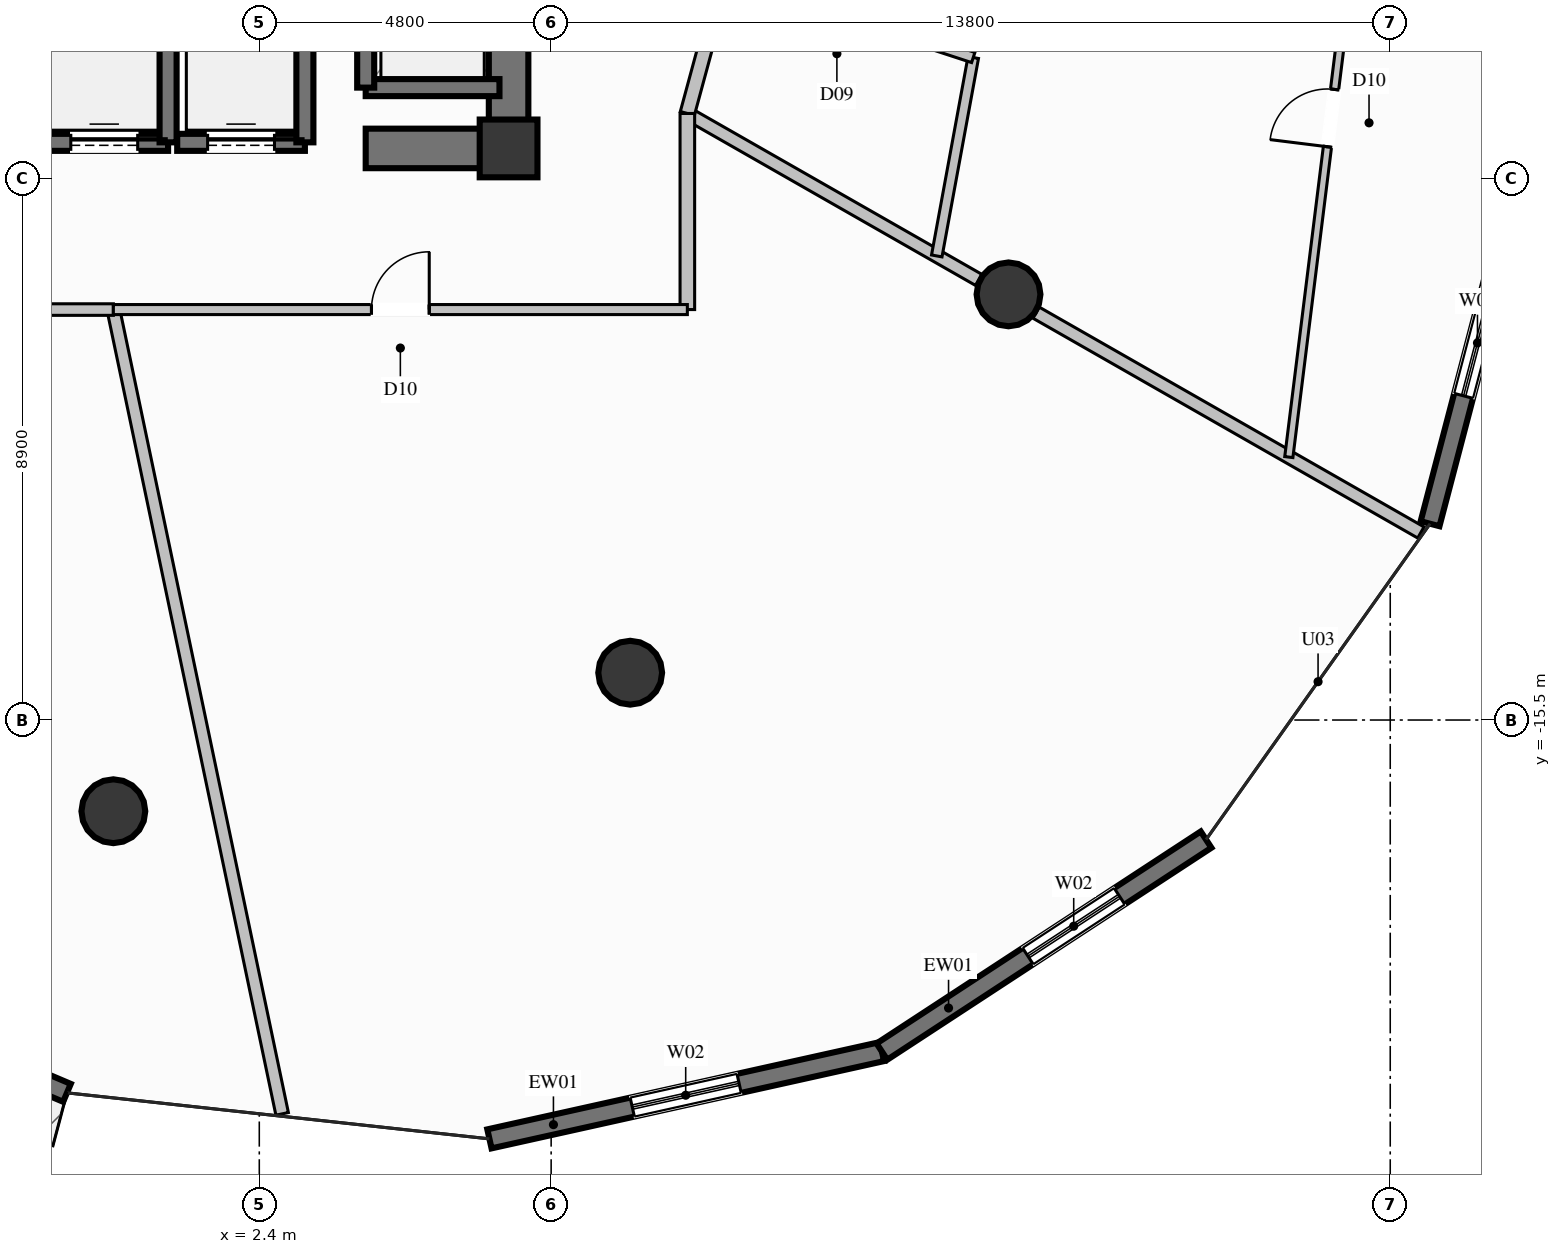
"""IFC4 building model, lengths in metres.
Left out: names, types, materials, properties, quantities, classifications, styles, units other than length and angle.
Written with IfcOpenShell. Run it as: python <this file> out.ifc"""

import sys

from ifc_helpers import new_model, si_unit, direction, frame, frame_2d, origin, origin_2d, place, context, subcontext, project, spatial, rectangle, circle, extrude, element, fill, save


model = new_model("IFC4")
c1 = context("Model", 3, precision=1e-05, world=origin(), true_north=direction((0.0, 1.0)))
c2 = subcontext(c1, "Body", "Model", "MODEL_VIEW")
j1 = project(units=[si_unit("LENGTHUNIT", "METRE"), si_unit("PLANEANGLEUNIT", "RADIAN")], contexts=[c1])
p1 = place(None, origin())
s1 = spatial("IfcSite", under=j1, at=p1, CompositionType="ELEMENT")
p2 = place(p1, origin())
s2 = spatial("IfcBuilding", under=s1, at=p2, CompositionType="ELEMENT")
p3 = place(p2, frame((0.0, 0.0, 149.4)))
s3 = spatial("IfcBuildingStorey", under=s2, at=p3, CompositionType="ELEMENT", Elevation=149.4)
p4 = place(p3, frame((6.5, -6.1, 0.0), z_axis=(0.0, 0.0, 1.0), x_axis=(1.0, 0.0, 0.0)))
e1 = element("IfcColumn", 1, at=p4, inside=s3, PredefinedType="COLUMN", context=c2, shape_type="SweptSolid", body=[
    extrude(rectangle(XDim=0.95, YDim=0.95, at=origin_2d()), origin(), (0.0, 0.0, 1.0), 3.6),
])
p5 = place(p3, frame((4.15, -6.1, 0.0), z_axis=(0.0, 0.0, 1.0), x_axis=(1.0, 0.0, 0.0)))
e2 = element("IfcWall", 2, at=p5, inside=s3, PredefinedType="SHEAR", context=c2, shape_type="SweptSolid", body=[
    extrude(rectangle(XDim=2.025, YDim=0.65, at=frame_2d((1.013, 0.0))), origin(), (0.0, 0.0, 1.0), 3.6),
])
p6 = place(p3, frame((6.5, -6.425, 0.0), z_axis=(0.0, 0.0, 1.0), x_axis=(0.0, 1.0, 0.0)))
e3 = element("IfcWall", 3, at=p6, inside=s3, PredefinedType="SHEAR", context=c2, shape_type="SweptSolid", body=[
    extrude(rectangle(XDim=4.075, YDim=0.65, at=frame_2d((2.038, 0.0))), origin(), (0.0, 0.0, 1.0), 3.6),
])
for number, where, z_axis, x_axis in (
    (4, (0.0, -17.0, 0.0), (0.0, 0.0, 1.0), (1.0, 0.0, 0.0)),
    (5, (8.5, -14.722, 0.0), (0.0, 0.0, 1.0), (1.0, 0.0, 0.0)),
    (6, (14.722, -8.5, 0.0), (0.0, 0.0, 1.0), (1.0, 0.0, 0.0)),
):
    element("IfcColumn", number, at=place(p3, frame(where, z_axis=z_axis, x_axis=x_axis)), inside=s3, PredefinedType="COLUMN", context=c2, shape_type="SweptSolid", body=[
        extrude(circle(Radius=0.525, at=origin_2d()), origin(), (0.0, 0.0, 1.0), 3.6),
    ])
p7 = place(p3, frame((23.332, -5.875, 0.0), z_axis=(0.0, 0.0, 1.0), x_axis=(-0.253586412891, -0.967312737018, 0.0)))
e7 = element("IfcWall", 7, at=p7, inside=s3, PredefinedType="SOLIDWALL", context=c2, shape_type="SweptSolid", body=[
    extrude(rectangle(XDim=6.613, YDim=0.32, at=frame_2d((3.307, 0.0))), origin(), (0.0, 0.0, 1.0), 3.35),
])
p8 = place(p7, frame((2.639, 0.0, 0.35)))
e8 = element("IfcOpeningElement", 8, at=p8, cuts=e7, PredefinedType="OPENING", context=c2, shape_type="SweptSolid", body=[
    extrude(rectangle(XDim=1.8, YDim=2.6, at=frame_2d((0.9, 1.3))), frame((0.0, 0.17, 0.0), z_axis=(0.0, -1.0, 0.0), x_axis=(1.0, 0.0, 0.0)), (0.0, 0.0, 1.0), 0.34),
])
p9 = place(p3, frame((-0.763, -21.631, 0.0), z_axis=(0.0, 0.0, 1.0), x_axis=(-0.920301307609, 0.391210305607, 0.0)))
e9 = element("IfcWall", 9, at=p9, inside=s3, PredefinedType="SOLIDWALL", context=c2, shape_type="SweptSolid", body=[
    extrude(rectangle(XDim=7.346, YDim=0.32, at=frame_2d((3.673, 0.0))), origin(), (0.0, 0.0, 1.0), 3.35),
])
p10 = place(p9, frame((2.773, 0.0, 0.35)))
e10 = element("IfcOpeningElement", 10, at=p10, cuts=e9, PredefinedType="OPENING", context=c2, shape_type="SweptSolid", body=[
    extrude(rectangle(XDim=1.8, YDim=2.6, at=frame_2d((0.9, 1.3))), frame((0.0, 0.17, 0.0), z_axis=(0.0, -1.0, 0.0), x_axis=(1.0, 0.0, 0.0)), (0.0, 0.0, 1.0), 0.34),
])
p11 = place(p3, frame((12.64, -20.953, 0.0), z_axis=(0.0, 0.0, 1.0), x_axis=(-0.976166205915, -0.217024280736, 0.0)))
e11 = element("IfcWall", 11, at=p11, inside=s3, PredefinedType="SOLIDWALL", context=c2, shape_type="SweptSolid", body=[
    extrude(rectangle(XDim=6.613, YDim=0.32, at=frame_2d((3.306, 0.0))), origin(), (0.0, 0.0, 1.0), 3.35),
])
p12 = place(p11, frame((2.406, 0.0, 0.35)))
e12 = element("IfcOpeningElement", 12, at=p12, cuts=e11, PredefinedType="OPENING", context=c2, shape_type="SweptSolid", body=[
    extrude(rectangle(XDim=1.8, YDim=2.6, at=frame_2d((0.9, 1.3))), frame((0.0, 0.17, 0.0), z_axis=(0.0, -1.0, 0.0), x_axis=(1.0, 0.0, 0.0)), (0.0, 0.0, 1.0), 0.34),
])
p13 = place(p3, frame((17.971, -17.467, 0.0), z_axis=(0.0, 0.0, 1.0), x_axis=(-0.836958810109, -0.547265886185, 0.0)))
e13 = element("IfcWall", 13, at=p13, inside=s3, PredefinedType="SOLIDWALL", context=c2, shape_type="SweptSolid", body=[
    extrude(rectangle(XDim=6.37, YDim=0.32, at=frame_2d((3.185, 0.0))), origin(), (0.0, 0.0, 1.0), 3.35),
])
p14 = place(p13, frame((1.701, 0.0, 0.35)))
e14 = element("IfcOpeningElement", 14, at=p14, cuts=e13, PredefinedType="OPENING", context=c2, shape_type="SweptSolid", body=[
    extrude(rectangle(XDim=1.8, YDim=2.6, at=frame_2d((0.9, 1.3))), frame((0.0, 0.17, 0.0), z_axis=(0.0, -1.0, 0.0), x_axis=(1.0, 0.0, 0.0)), (0.0, 0.0, 1.0), 0.34),
])
p15 = place(p3, frame((-1.2, -6.0, 0.0), z_axis=(0.0, 0.0, 1.0), x_axis=(1.0, 0.0, 0.0)))
e15 = element("IfcWall", 15, at=p15, inside=s3, PredefinedType="SOLIDWALL", context=c2, shape_type="SweptSolid", body=[
    extrude(rectangle(XDim=2.1, YDim=0.28, at=frame_2d((1.05, 0.0))), origin(), (0.0, 0.0, 1.0), 3.35),
])
p16 = place(p15, frame((0.5, 0.0, 0.0)))
e16 = element("IfcOpeningElement", 16, at=p16, cuts=e15, PredefinedType="OPENING", context=c2, shape_type="SweptSolid", body=[
    extrude(rectangle(XDim=1.1, YDim=2.2, at=frame_2d((0.55, 1.1))), frame((0.0, 0.15, 0.0), z_axis=(0.0, -1.0, 0.0), x_axis=(1.0, 0.0, 0.0)), (0.0, 0.0, 1.0), 0.3),
])
p17 = place(p3, frame((0.9, -6.0, 0.0), z_axis=(0.0, 0.0, 1.0), x_axis=(0.0, 1.0, 0.0)))
e17 = element("IfcWall", 17, at=p17, inside=s3, PredefinedType="SOLIDWALL", context=c2, shape_type="SweptSolid", body=[
    extrude(rectangle(XDim=2.5, YDim=0.28, at=frame_2d((1.25, 0.0))), origin(), (0.0, 0.0, 1.0), 3.35),
])
p18 = place(p3, frame((1.05, -6.0, 0.0), z_axis=(0.0, 0.0, 1.0), x_axis=(1.0, 0.0, 0.0)))
e18 = element("IfcWall", 18, at=p18, inside=s3, PredefinedType="SOLIDWALL", context=c2, shape_type="SweptSolid", body=[
    extrude(rectangle(XDim=2.1, YDim=0.28, at=frame_2d((1.05, 0.0))), origin(), (0.0, 0.0, 1.0), 3.35),
])
p19 = place(p18, frame((0.5, 0.0, 0.0)))
e19 = element("IfcOpeningElement", 19, at=p19, cuts=e18, PredefinedType="OPENING", context=c2, shape_type="SweptSolid", body=[
    extrude(rectangle(XDim=1.1, YDim=2.2, at=frame_2d((0.55, 1.1))), frame((0.0, 0.15, 0.0), z_axis=(0.0, -1.0, 0.0), x_axis=(1.0, 0.0, 0.0)), (0.0, 0.0, 1.0), 0.3),
])
p20 = place(p3, frame((3.15, -6.0, 0.0), z_axis=(0.0, 0.0, 1.0), x_axis=(0.0, 1.0, 0.0)))
e20 = element("IfcWall", 20, at=p20, inside=s3, PredefinedType="SOLIDWALL", context=c2, shape_type="SweptSolid", body=[
    extrude(rectangle(XDim=2.5, YDim=0.28, at=frame_2d((1.25, 0.0))), origin(), (0.0, 0.0, 1.0), 3.35),
])
p21 = place(p3, frame((4.15, -5.1, 0.0), z_axis=(0.0, 0.0, 1.0), x_axis=(1.0, 0.0, 0.0)))
e21 = element("IfcWall", 21, at=p21, inside=s3, PredefinedType="SOLIDWALL", context=c2, shape_type="SweptSolid", body=[
    extrude(rectangle(XDim=2.2, YDim=0.28, at=frame_2d((1.1, 0.0))), origin(), (0.0, 0.0, 1.0), 3.35),
])
p22 = place(p3, frame((4.15, -2.4, 0.0), z_axis=(0.0, 0.0, 1.0), x_axis=(0.0, -1.0, 0.0)))
e22 = element("IfcWall", 22, at=p22, inside=s3, PredefinedType="SOLIDWALL", context=c2, shape_type="SweptSolid", body=[
    extrude(rectangle(XDim=2.7, YDim=0.28, at=frame_2d((1.35, 0.0))), origin(), (0.0, 0.0, 1.0), 3.35),
])
p23 = place(p3, frame((9.44, -5.525, 0.0), z_axis=(0.0, 0.0, 1.0), x_axis=(0.868338411793, -0.495972179265, 0.0)))
e23 = element("IfcWall", 23, at=p23, inside=s3, PredefinedType="PARTITIONING", context=c2, shape_type="SweptSolid", body=[
    extrude(rectangle(XDim=5.519, YDim=0.21, at=frame_2d((2.759, 0.0))), origin(), (0.0, 0.0, 1.0), 2.717),
])
p24 = place(p3, frame((15.176, -8.801, 0.0), z_axis=(0.0, 0.0, 1.0), x_axis=(0.868298798987, -0.496041526162, 0.0)))
e24 = element("IfcWall", 24, at=p24, inside=s3, PredefinedType="PARTITIONING", context=c2, shape_type="SweptSolid", body=[
    extrude(rectangle(XDim=7.288, YDim=0.21, at=frame_2d((3.644, 0.0))), origin(), (0.0, 0.0, 1.0), 3.35),
])
p25 = place(p3, frame((9.44, -5.525, 0.0), z_axis=(0.0, 0.0, 1.0), x_axis=(0.262136756532, 0.965030735715, 0.0)))
e25 = element("IfcWall", 25, at=p25, inside=s3, PredefinedType="PARTITIONING", context=c2, shape_type="SweptSolid", body=[
    extrude(rectangle(XDim=2.339, YDim=0.24, at=frame_2d((1.169, 0.0))), origin(), (0.0, 0.0, 1.0), 3.35),
])
p26 = place(p3, frame((13.542, -7.868, 0.0), z_axis=(0.0, 0.0, 1.0), x_axis=(0.180879603069, 0.983505246144, 0.0)))
e26 = element("IfcWall", 26, at=p26, inside=s3, PredefinedType="PLUMBINGWALL", context=c2, shape_type="SweptSolid", body=[
    extrude(rectangle(XDim=3.318, YDim=0.175, at=frame_2d((1.659, 0.0))), origin(), (0.0, 0.0, 1.0), 3.35),
])
p27 = place(p3, frame((10.053, -3.268, 0.0), z_axis=(0.0, 0.0, 1.0), x_axis=(0.950489200724, -0.310757589299, 0.0)))
e27 = element("IfcWall", 27, at=p27, inside=s3, PredefinedType="PLUMBINGWALL", context=c2, shape_type="SweptSolid", body=[
    extrude(rectangle(XDim=4.302, YDim=0.175, at=frame_2d((2.151, 0.0))), origin(), (0.0, 0.0, 1.0), 3.35),
])
p28 = place(p27, frame((1.701, 0.0, 0.0)))
e28 = element("IfcOpeningElement", 28, at=p28, cuts=e27, PredefinedType="OPENING", context=c2, shape_type="SweptSolid", body=[
    extrude(rectangle(XDim=0.9, YDim=2.1, at=frame_2d((0.45, 1.05))), frame((0.0, 0.098, 0.0), z_axis=(0.0, -1.0, 0.0), x_axis=(1.0, 0.0, 0.0)), (0.0, 0.0, 1.0), 0.195),
])
p29 = place(p3, frame((19.332, -11.176, 0.0), z_axis=(0.0, 0.0, 1.0), x_axis=(0.123537260256, 0.992339934361, 0.0)))
e29 = element("IfcWall", 29, at=p29, inside=s3, PredefinedType="PARTITIONING", context=c2, shape_type="SweptSolid", body=[
    extrude(rectangle(XDim=11.235, YDim=0.135, at=frame_2d((5.618, 0.0))), origin(), (0.0, 0.0, 1.0), 3.35),
])
p30 = place(p29, frame((5.143, 0.0, 0.0)))
e30 = element("IfcOpeningElement", 30, at=p30, cuts=e29, PredefinedType="OPENING", context=c2, shape_type="SweptSolid", body=[
    extrude(rectangle(XDim=0.95, YDim=2.1, at=frame_2d((0.475, 1.05))), frame((0.0, 0.078, 0.0), z_axis=(0.0, -1.0, 0.0), x_axis=(1.0, 0.0, 0.0)), (0.0, 0.0, 1.0), 0.155),
])
p31 = place(p3, frame((0.0, -8.75, 0.0), z_axis=(0.0, 0.0, 1.0), x_axis=(0.205389549812, -0.978680301645, 0.0)))
e31 = element("IfcWall", 31, at=p31, inside=s3, PredefinedType="PARTITIONING", context=c2, shape_type="SweptSolid", body=[
    extrude(rectangle(XDim=13.515, YDim=0.21, at=frame_2d((6.758, 0.0))), origin(), (0.0, 0.0, 1.0), 3.35),
])
p32 = place(p3, frame((-9.44, -8.75, 0.0), z_axis=(0.0, 0.0, 1.0), x_axis=(1.0, 0.0, 0.0)))
e32 = element("IfcWall", 32, at=p32, inside=s3, PredefinedType="PARTITIONING", context=c2, shape_type="SweptSolid", body=[
    extrude(rectangle(XDim=9.44, YDim=0.19, at=frame_2d((4.72, 0.0))), origin(), (0.0, 0.0, 1.0), 3.35),
])
p33 = place(p32, frame((4.245, 0.0, 0.0)))
e33 = element("IfcOpeningElement", 33, at=p33, cuts=e32, PredefinedType="OPENING", context=c2, shape_type="SweptSolid", body=[
    extrude(rectangle(XDim=0.95, YDim=2.1, at=frame_2d((0.475, 1.05))), frame((0.0, 0.105, 0.0), z_axis=(0.0, -1.0, 0.0), x_axis=(1.0, 0.0, 0.0)), (0.0, 0.0, 1.0), 0.21),
])
p34 = place(p3, frame((9.44, -8.75, 0.0), z_axis=(0.0, 0.0, 1.0), x_axis=(0.0, 1.0, 0.0)))
e34 = element("IfcWall", 34, at=p34, inside=s3, PredefinedType="PARTITIONING", context=c2, shape_type="SweptSolid", body=[
    extrude(rectangle(XDim=3.225, YDim=0.24, at=frame_2d((1.613, 0.0))), origin(), (0.0, 0.0, 1.0), 3.35),
])
p35 = place(p3, frame((0.0, -8.75, 0.0), z_axis=(0.0, 0.0, 1.0), x_axis=(1.0, 0.0, 0.0)))
e35 = element("IfcWall", 35, at=p35, inside=s3, PredefinedType="PARTITIONING", context=c2, shape_type="SweptSolid", body=[
    extrude(rectangle(XDim=9.44, YDim=0.165, at=frame_2d((4.72, 0.0))), origin(), (0.0, 0.0, 1.0), 3.35),
])
p36 = place(p35, frame((4.245, 0.0, 0.0)))
e36 = element("IfcOpeningElement", 36, at=p36, cuts=e35, PredefinedType="OPENING", context=c2, shape_type="SweptSolid", body=[
    extrude(rectangle(XDim=0.95, YDim=2.1, at=frame_2d((0.475, 1.05))), frame((0.0, 0.093, 0.0), z_axis=(0.0, -1.0, 0.0), x_axis=(1.0, 0.0, 0.0)), (0.0, 0.0, 1.0), 0.185),
])
p37 = place(p8, origin())
e37 = element("IfcWindow", 37, at=p37, inside=s3, PartitioningType="SINGLE_PANEL", PredefinedType="WINDOW", context=c2, shape_type="SweptSolid", body=[
    extrude(rectangle(XDim=1.8, YDim=2.6, at=frame_2d((0.9, 1.3))), frame((0.0, 0.03, 0.0), z_axis=(0.0, -1.0, 0.0), x_axis=(1.0, 0.0, 0.0)), (0.0, 0.0, 1.0), 0.06),
])
fill(e8, e37)
p38 = place(p12, origin())
e38 = element("IfcWindow", 38, at=p38, inside=s3, PartitioningType="SINGLE_PANEL", PredefinedType="WINDOW", context=c2, shape_type="SweptSolid", body=[
    extrude(rectangle(XDim=1.8, YDim=2.6, at=frame_2d((0.9, 1.3))), frame((0.0, 0.03, 0.0), z_axis=(0.0, -1.0, 0.0), x_axis=(1.0, 0.0, 0.0)), (0.0, 0.0, 1.0), 0.06),
])
fill(e12, e38)
p39 = place(p14, origin())
e39 = element("IfcWindow", 39, at=p39, inside=s3, PartitioningType="SINGLE_PANEL", PredefinedType="WINDOW", context=c2, shape_type="SweptSolid", body=[
    extrude(rectangle(XDim=1.8, YDim=2.6, at=frame_2d((0.9, 1.3))), frame((0.0, 0.03, 0.0), z_axis=(0.0, -1.0, 0.0), x_axis=(1.0, 0.0, 0.0)), (0.0, 0.0, 1.0), 0.06),
])
fill(e14, e39)
p40 = place(p16, origin())
e40 = element("IfcDoor", 40, at=p40, inside=s3, OperationType="SLIDING_TO_LEFT", PredefinedType="DOOR", context=c2, shape_type="SweptSolid", body=[
    extrude(rectangle(XDim=1.1, YDim=2.2, at=frame_2d((0.55, 1.1))), frame((0.0, 0.025, 0.0), z_axis=(0.0, -1.0, 0.0), x_axis=(1.0, 0.0, 0.0)), (0.0, 0.0, 1.0), 0.05),
])
fill(e16, e40)
p41 = place(p19, origin())
e41 = element("IfcDoor", 41, at=p41, inside=s3, OperationType="SLIDING_TO_LEFT", PredefinedType="DOOR", context=c2, shape_type="SweptSolid", body=[
    extrude(rectangle(XDim=1.1, YDim=2.2, at=frame_2d((0.55, 1.1))), frame((0.0, 0.025, 0.0), z_axis=(0.0, -1.0, 0.0), x_axis=(1.0, 0.0, 0.0)), (0.0, 0.0, 1.0), 0.05),
])
fill(e19, e41)
p42 = place(p30, origin())
e42 = element("IfcDoor", 42, at=p42, inside=s3, OperationType="SINGLE_SWING_LEFT", PredefinedType="DOOR", context=c2, shape_type="SweptSolid", body=[
    extrude(rectangle(XDim=0.95, YDim=2.1, at=frame_2d((0.475, 1.05))), frame((0.0, 0.025, 0.0), z_axis=(0.0, -1.0, 0.0), x_axis=(1.0, 0.0, 0.0)), (0.0, 0.0, 1.0), 0.05),
])
fill(e30, e42)
p43 = place(p36, origin())
e43 = element("IfcDoor", 43, at=p43, inside=s3, OperationType="SINGLE_SWING_RIGHT", PredefinedType="DOOR", context=c2, shape_type="SweptSolid", body=[
    extrude(rectangle(XDim=0.95, YDim=2.1, at=frame_2d((0.475, 1.05))), frame((0.0, 0.025, 0.0), z_axis=(0.0, -1.0, 0.0), x_axis=(1.0, 0.0, 0.0)), (0.0, 0.0, 1.0), 0.05),
])
fill(e36, e43)
save(model, sys.argv[1])
